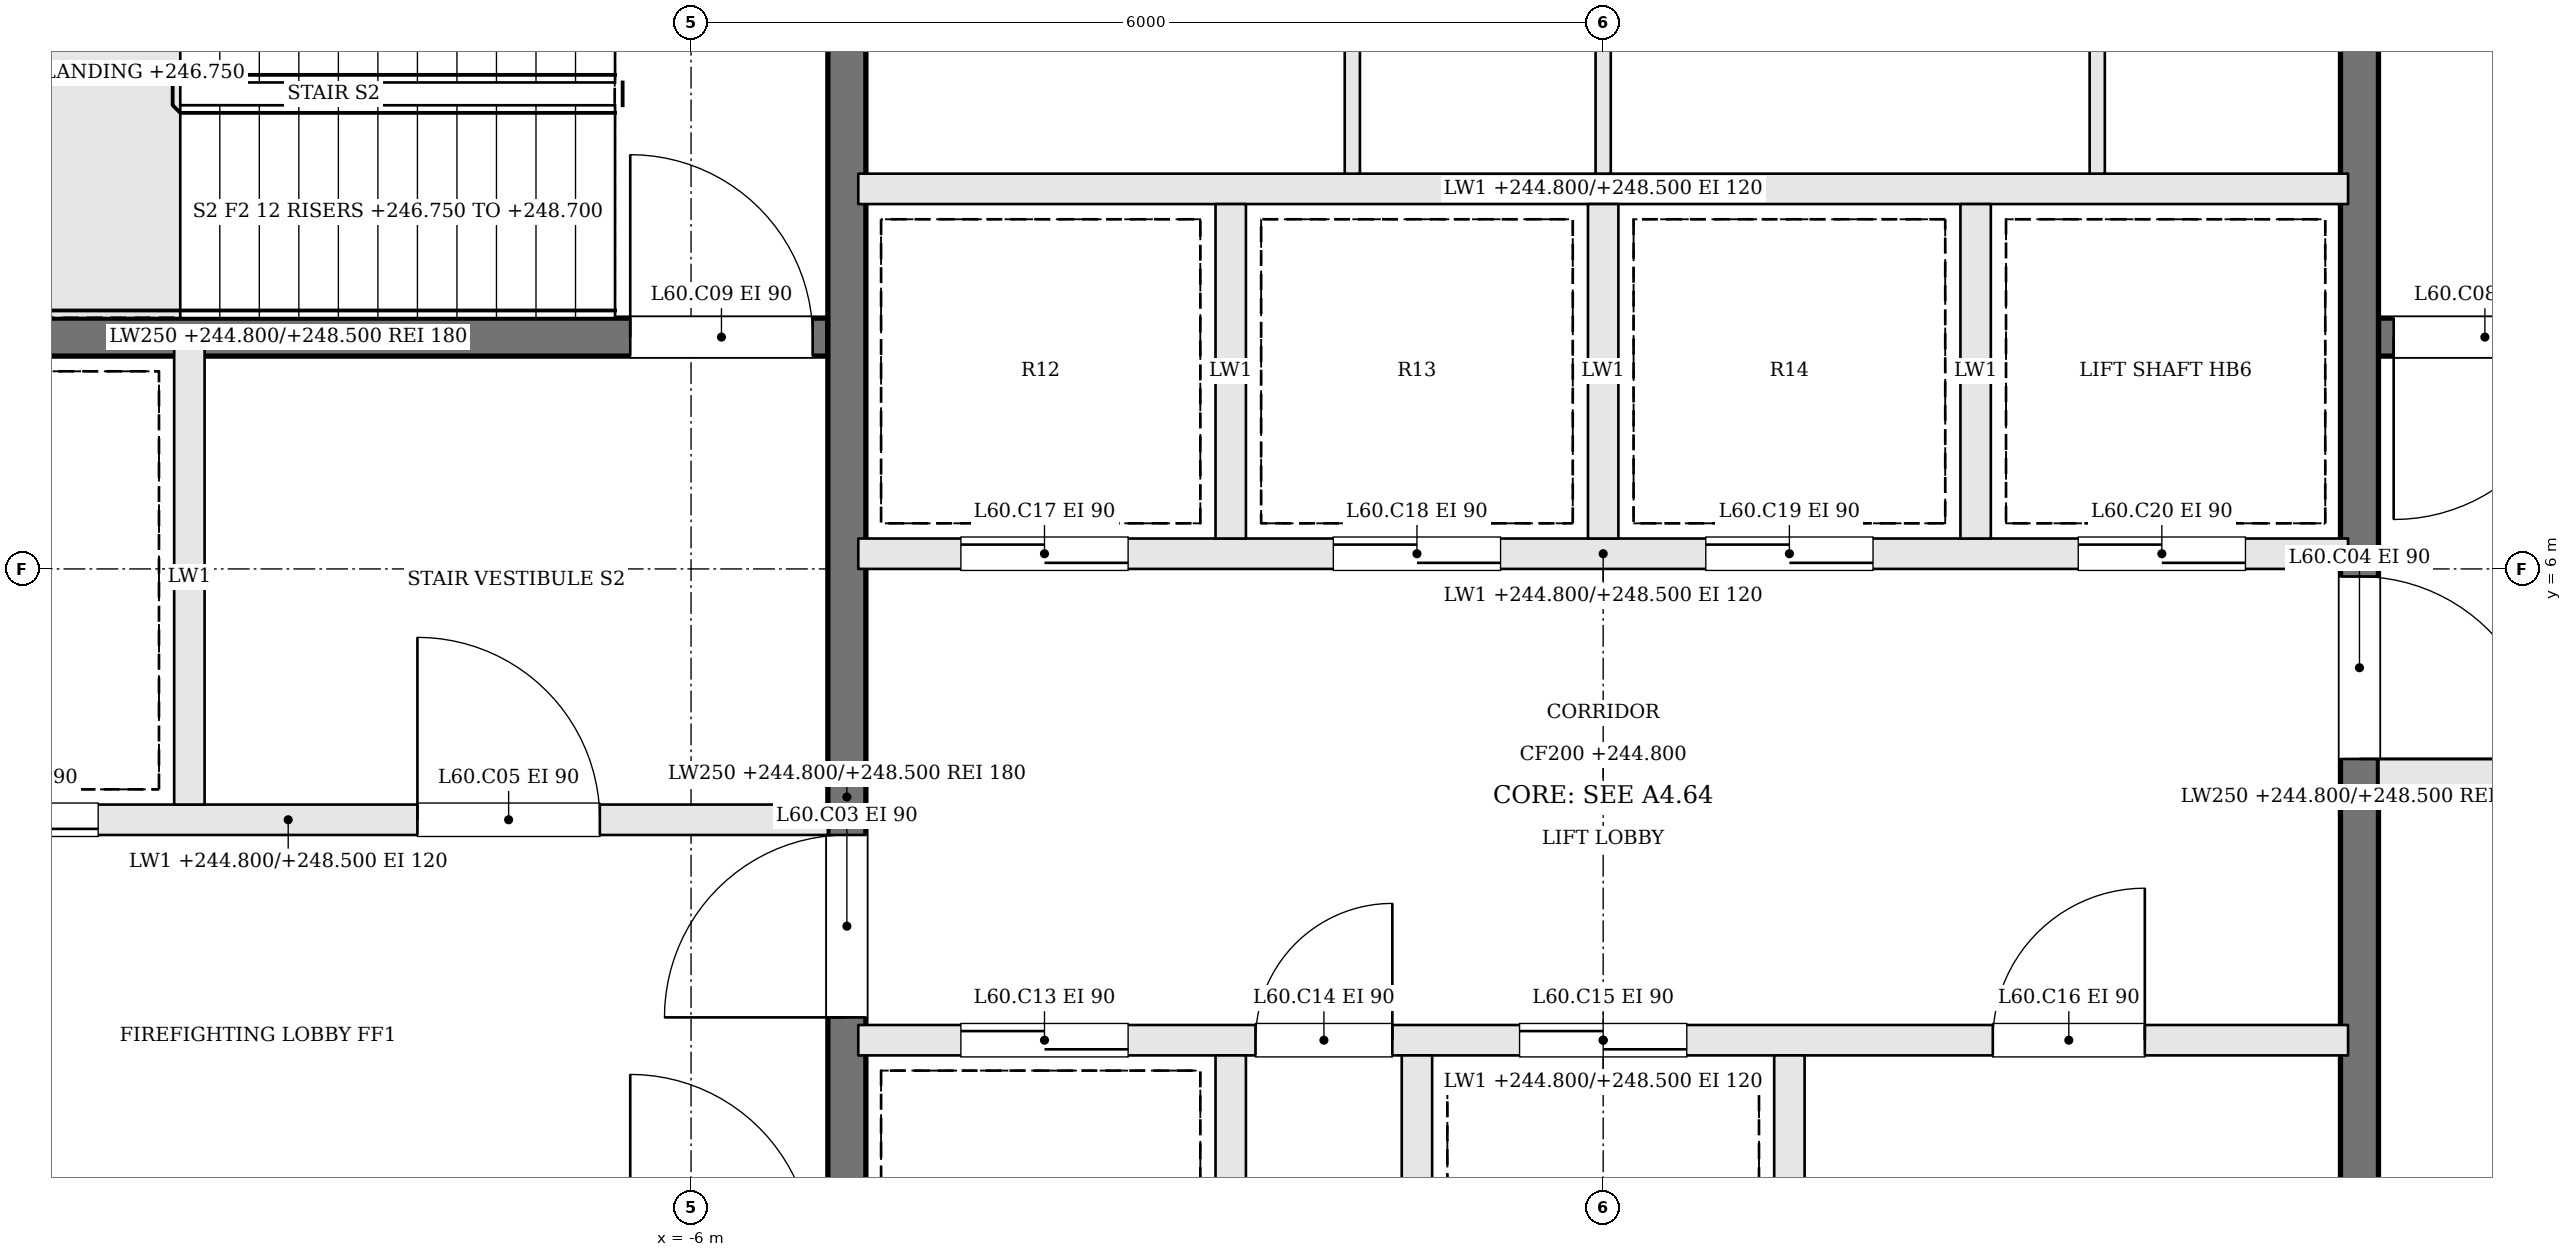
"""IFC4 building model, lengths in metres.
Left out: names, types, materials, properties, quantities, classifications, styles, units other than length and angle.
Written with IfcOpenShell. Run it as: python <this file> out.ifc"""

import sys

from ifc_helpers import new_model, si_unit, direction, frame, frame_2d, origin, place, context, subcontext, project, spatial, rectangle, extrude, element, fill, save


model = new_model("IFC4")
c1 = context("Model", 3, precision=1e-05, world=origin(), true_north=direction((0.0, 1.0)))
c2 = subcontext(c1, "Body", "Model", "MODEL_VIEW")
j1 = project(units=[si_unit("LENGTHUNIT", "METRE"), si_unit("PLANEANGLEUNIT", "RADIAN")], contexts=[c1])
p1 = place(None, origin())
s1 = spatial("IfcSite", under=j1, at=p1, CompositionType="ELEMENT")
p2 = place(p1, origin())
s2 = spatial("IfcBuilding", under=s1, at=p2, CompositionType="ELEMENT")
p3 = place(p2, frame((0.0, 0.0, 244.8)))
s3 = spatial("IfcBuildingStorey", under=s2, at=p3, CompositionType="ELEMENT", Elevation=244.8)
p4 = place(p3, frame((12.2, 7.525, 0.0), z_axis=(0.0, 0.0, 1.0), x_axis=(-1.0, 0.0, 0.0)))
e1 = element("IfcWall", 1, at=p4, inside=s3, PredefinedType="SOLIDWALL", context=c2, shape_type="SweptSolid", body=[
    extrude(rectangle(XDim=7.1, YDim=0.25, at=frame_2d((3.55, 0.0))), origin(), (0.0, 0.0, 1.0), 3.7),
])
p5 = place(p4, frame((5.8, 0.0, 0.0)))
e2 = element("IfcOpeningElement", 2, at=p5, cuts=e1, PredefinedType="OPENING", context=c2, shape_type="SweptSolid", body=[
    extrude(rectangle(XDim=1.2, YDim=2.1, at=frame_2d((0.6, 1.05))), frame((0.0, 0.135, 0.0), z_axis=(0.0, -1.0, 0.0), x_axis=(1.0, 0.0, 0.0)), (0.0, 0.0, 1.0), 0.27),
])
p6 = place(p3, frame((-12.2, 4.35, 0.0), z_axis=(0.0, 0.0, 1.0), x_axis=(1.0, 0.0, 0.0)))
e3 = element("IfcWall", 3, at=p6, inside=s3, PredefinedType="SOLIDWALL", context=c2, shape_type="SweptSolid", body=[
    extrude(rectangle(XDim=7.1, YDim=0.2, at=frame_2d((3.55, 0.0))), origin(), (0.0, 0.0, 1.0), 3.7),
])
p7 = place(p6, frame((4.4, 0.0, 0.0)))
e4 = element("IfcOpeningElement", 4, at=p7, cuts=e3, PredefinedType="OPENING", context=c2, shape_type="SweptSolid", body=[
    extrude(rectangle(XDim=1.2, YDim=2.1, at=frame_2d((0.6, 1.05))), frame((0.0, 0.11, 0.0), z_axis=(0.0, -1.0, 0.0), x_axis=(1.0, 0.0, 0.0)), (0.0, 0.0, 1.0), 0.22),
])
p8 = place(p6, frame((1.1, 0.0, 0.0)))
e5 = element("IfcOpeningElement", 5, at=p8, cuts=e3, PredefinedType="OPENING", context=c2, shape_type="SweptSolid", body=[
    extrude(rectangle(XDim=1.2, YDim=2.1, at=frame_2d((0.6, 1.05))), frame((0.0, 0.11, 0.0), z_axis=(0.0, -1.0, 0.0), x_axis=(1.0, 0.0, 0.0)), (0.0, 0.0, 1.0), 0.22),
])
p9 = place(p3, frame((12.2, 4.65, 0.0), z_axis=(0.0, 0.0, 1.0), x_axis=(-1.0, 0.0, 0.0)))
e6 = element("IfcWall", 6, at=p9, inside=s3, PredefinedType="SOLIDWALL", context=c2, shape_type="SweptSolid", body=[
    extrude(rectangle(XDim=7.1, YDim=0.2, at=frame_2d((3.55, 0.0))), origin(), (0.0, 0.0, 1.0), 3.7),
])
p10 = place(p9, frame((4.4, 0.0, 0.0)))
e7 = element("IfcOpeningElement", 7, at=p10, cuts=e6, PredefinedType="OPENING", context=c2, shape_type="SweptSolid", body=[
    extrude(rectangle(XDim=1.2, YDim=2.1, at=frame_2d((0.6, 1.05))), frame((0.0, 0.11, 0.0), z_axis=(0.0, -1.0, 0.0), x_axis=(1.0, 0.0, 0.0)), (0.0, 0.0, 1.0), 0.22),
])
p11 = place(p9, frame((1.1, 0.0, 0.0)))
e8 = element("IfcOpeningElement", 8, at=p11, cuts=e6, PredefinedType="OPENING", context=c2, shape_type="SweptSolid", body=[
    extrude(rectangle(XDim=1.2, YDim=2.1, at=frame_2d((0.6, 1.05))), frame((0.0, 0.11, 0.0), z_axis=(0.0, -1.0, 0.0), x_axis=(1.0, 0.0, 0.0)), (0.0, 0.0, 1.0), 0.22),
])
p12 = place(p3, frame((-12.2, 7.525, 0.0), z_axis=(0.0, 0.0, 1.0), x_axis=(1.0, 0.0, 0.0)))
e9 = element("IfcWall", 9, at=p12, inside=s3, PredefinedType="SOLIDWALL", context=c2, shape_type="SweptSolid", body=[
    extrude(rectangle(XDim=7.1, YDim=0.25, at=frame_2d((3.55, 0.0))), origin(), (0.0, 0.0, 1.0), 3.7),
])
p13 = place(p12, frame((5.8, 0.0, 0.0)))
e10 = element("IfcOpeningElement", 10, at=p13, cuts=e9, PredefinedType="OPENING", context=c2, shape_type="SweptSolid", body=[
    extrude(rectangle(XDim=1.2, YDim=2.1, at=frame_2d((0.6, 1.05))), frame((0.0, 0.135, 0.0), z_axis=(0.0, -1.0, 0.0), x_axis=(1.0, 0.0, 0.0)), (0.0, 0.0, 1.0), 0.27),
])
p14 = place(p3, frame((-9.3, 4.45, 0.0), z_axis=(0.0, 0.0, 1.0), x_axis=(0.0, 1.0, 0.0)))
e11 = element("IfcWall", 11, at=p14, inside=s3, PredefinedType="SOLIDWALL", context=c2, shape_type="SweptSolid", body=[
    extrude(rectangle(XDim=3.0, YDim=0.2, at=frame_2d((1.5, 0.0))), origin(), (0.0, 0.0, 1.0), 3.7),
])
p15 = place(p3, frame((-4.975, -2.2, 0.0), z_axis=(0.0, 0.0, 1.0), x_axis=(0.0, 1.0, 0.0)))
e12 = element("IfcWall", 12, at=p15, inside=s3, PredefinedType="SOLIDWALL", context=c2, shape_type="SweptSolid", body=[
    extrude(rectangle(XDim=13.4, YDim=0.25, at=frame_2d((6.7, 0.0))), origin(), (0.0, 0.0, 1.0), 3.7),
])
p16 = place(p15, frame((5.25, 0.0, 0.0)))
e13 = element("IfcOpeningElement", 13, at=p16, cuts=e12, PredefinedType="OPENING", context=c2, shape_type="SweptSolid", body=[
    extrude(rectangle(XDim=1.2, YDim=2.1, at=frame_2d((0.6, 1.05))), frame((0.0, 0.135, 0.0), z_axis=(0.0, -1.0, 0.0), x_axis=(1.0, 0.0, 0.0)), (0.0, 0.0, 1.0), 0.27),
])
p17 = place(p3, frame((4.975, 11.2, 0.0), z_axis=(0.0, 0.0, 1.0), x_axis=(0.0, -1.0, 0.0)))
e14 = element("IfcWall", 14, at=p17, inside=s3, PredefinedType="SOLIDWALL", context=c2, shape_type="SweptSolid", body=[
    extrude(rectangle(XDim=13.4, YDim=0.25, at=frame_2d((6.7, 0.0))), origin(), (0.0, 0.0, 1.0), 3.7),
])
p18 = place(p17, frame((5.25, 0.0, 0.0)))
e15 = element("IfcOpeningElement", 15, at=p18, cuts=e14, PredefinedType="OPENING", context=c2, shape_type="SweptSolid", body=[
    extrude(rectangle(XDim=1.2, YDim=2.1, at=frame_2d((0.6, 1.05))), frame((0.0, 0.135, 0.0), z_axis=(0.0, -1.0, 0.0), x_axis=(1.0, 0.0, 0.0)), (0.0, 0.0, 1.0), 0.27),
])
p19 = place(p3, frame((-4.9, 2.9, 0.0), z_axis=(0.0, 0.0, 1.0), x_axis=(1.0, 0.0, 0.0)))
e16 = element("IfcWall", 16, at=p19, inside=s3, PredefinedType="SOLIDWALL", context=c2, shape_type="SweptSolid", body=[
    extrude(rectangle(XDim=9.8, YDim=0.2, at=frame_2d((4.9, 0.0))), origin(), (0.0, 0.0, 1.0), 3.7),
])
p20 = place(p19, frame((0.675, 0.0, 0.0)))
e17 = element("IfcOpeningElement", 17, at=p20, cuts=e16, PredefinedType="OPENING", context=c2, shape_type="SweptSolid", body=[
    extrude(rectangle(XDim=1.1, YDim=2.1, at=frame_2d((0.55, 1.05))), frame((0.0, 0.11, 0.0), z_axis=(0.0, -1.0, 0.0), x_axis=(1.0, 0.0, 0.0)), (0.0, 0.0, 1.0), 0.22),
])
p21 = place(p19, frame((2.613, 0.0, 0.0)))
e18 = element("IfcOpeningElement", 18, at=p21, cuts=e16, PredefinedType="OPENING", context=c2, shape_type="SweptSolid", body=[
    extrude(rectangle(XDim=0.9, YDim=2.1, at=frame_2d((0.45, 1.05))), frame((0.0, 0.11, 0.0), z_axis=(0.0, -1.0, 0.0), x_axis=(1.0, 0.0, 0.0)), (0.0, 0.0, 1.0), 0.22),
])
p22 = place(p19, frame((4.35, 0.0, 0.0)))
e19 = element("IfcOpeningElement", 19, at=p22, cuts=e16, PredefinedType="OPENING", context=c2, shape_type="SweptSolid", body=[
    extrude(rectangle(XDim=1.1, YDim=2.1, at=frame_2d((0.55, 1.05))), frame((0.0, 0.11, 0.0), z_axis=(0.0, -1.0, 0.0), x_axis=(1.0, 0.0, 0.0)), (0.0, 0.0, 1.0), 0.22),
])
p23 = place(p19, frame((7.463, 0.0, 0.0)))
e20 = element("IfcOpeningElement", 20, at=p23, cuts=e16, PredefinedType="OPENING", context=c2, shape_type="SweptSolid", body=[
    extrude(rectangle(XDim=1.0, YDim=2.1, at=frame_2d((0.5, 1.05))), frame((0.0, 0.11, 0.0), z_axis=(0.0, -1.0, 0.0), x_axis=(1.0, 0.0, 0.0)), (0.0, 0.0, 1.0), 0.22),
])
p24 = place(p3, frame((-4.9, 6.1, 0.0), z_axis=(0.0, 0.0, 1.0), x_axis=(1.0, 0.0, 0.0)))
e21 = element("IfcWall", 21, at=p24, inside=s3, PredefinedType="SOLIDWALL", context=c2, shape_type="SweptSolid", body=[
    extrude(rectangle(XDim=9.8, YDim=0.2, at=frame_2d((4.9, 0.0))), origin(), (0.0, 0.0, 1.0), 3.7),
])
p25 = place(p24, frame((0.675, 0.0, 0.0)))
e22 = element("IfcOpeningElement", 22, at=p25, cuts=e21, PredefinedType="OPENING", context=c2, shape_type="SweptSolid", body=[
    extrude(rectangle(XDim=1.1, YDim=2.1, at=frame_2d((0.55, 1.05))), frame((0.0, 0.11, 0.0), z_axis=(0.0, -1.0, 0.0), x_axis=(1.0, 0.0, 0.0)), (0.0, 0.0, 1.0), 0.22),
])
p26 = place(p24, frame((3.125, 0.0, 0.0)))
e23 = element("IfcOpeningElement", 23, at=p26, cuts=e21, PredefinedType="OPENING", context=c2, shape_type="SweptSolid", body=[
    extrude(rectangle(XDim=1.1, YDim=2.1, at=frame_2d((0.55, 1.05))), frame((0.0, 0.11, 0.0), z_axis=(0.0, -1.0, 0.0), x_axis=(1.0, 0.0, 0.0)), (0.0, 0.0, 1.0), 0.22),
])
p27 = place(p24, frame((5.575, 0.0, 0.0)))
e24 = element("IfcOpeningElement", 24, at=p27, cuts=e21, PredefinedType="OPENING", context=c2, shape_type="SweptSolid", body=[
    extrude(rectangle(XDim=1.1, YDim=2.1, at=frame_2d((0.55, 1.05))), frame((0.0, 0.11, 0.0), z_axis=(0.0, -1.0, 0.0), x_axis=(1.0, 0.0, 0.0)), (0.0, 0.0, 1.0), 0.22),
])
p28 = place(p24, frame((8.025, 0.0, 0.0)))
e25 = element("IfcOpeningElement", 25, at=p28, cuts=e21, PredefinedType="OPENING", context=c2, shape_type="SweptSolid", body=[
    extrude(rectangle(XDim=1.1, YDim=2.1, at=frame_2d((0.55, 1.05))), frame((0.0, 0.11, 0.0), z_axis=(0.0, -1.0, 0.0), x_axis=(1.0, 0.0, 0.0)), (0.0, 0.0, 1.0), 0.22),
])
p29 = place(p3, frame((-4.9, 8.5, 0.0), z_axis=(0.0, 0.0, 1.0), x_axis=(1.0, 0.0, 0.0)))
e26 = element("IfcWall", 26, at=p29, inside=s3, PredefinedType="SOLIDWALL", context=c2, shape_type="SweptSolid", body=[
    extrude(rectangle(XDim=9.8, YDim=0.2, at=frame_2d((4.9, 0.0))), origin(), (0.0, 0.0, 1.0), 3.7),
])
for number, where, z_axis, x_axis in (
    (27, (-2.45, 0.6, 0.0), (0.0, 0.0, 1.0), (0.0, 1.0, 0.0)),
    (28, (-1.225, 0.6, 0.0), (0.0, 0.0, 1.0), (0.0, 1.0, 0.0)),
    (29, (1.225, 0.6, 0.0), (0.0, 0.0, 1.0), (0.0, 1.0, 0.0)),
    (30, (-2.45, 6.2, 0.0), (0.0, 0.0, 1.0), (0.0, 1.0, 0.0)),
    (31, (0.0, 6.2, 0.0), (0.0, 0.0, 1.0), (0.0, 1.0, 0.0)),
    (32, (2.45, 6.2, 0.0), (0.0, 0.0, 1.0), (0.0, 1.0, 0.0)),
):
    element("IfcWall", number, at=place(p3, frame(where, z_axis=z_axis, x_axis=x_axis)), inside=s3, PredefinedType="SOLIDWALL", context=c2, shape_type="SweptSolid", body=[
        extrude(rectangle(XDim=2.2, YDim=0.2, at=frame_2d((1.1, 0.0))), origin(), (0.0, 0.0, 1.0), 3.7),
    ])
for number, where, z_axis, x_axis in (
    (33, (-1.65, 8.6, 0.0), (0.0, 0.0, 1.0), (0.0, 1.0, 0.0)),
    (34, (0.0, 8.6, 0.0), (0.0, 0.0, 1.0), (0.0, 1.0, 0.0)),
    (35, (3.25, 8.6, 0.0), (0.0, 0.0, 1.0), (0.0, 1.0, 0.0)),
):
    element("IfcWall", number, at=place(p3, frame(where, z_axis=z_axis, x_axis=x_axis)), inside=s3, PredefinedType="PARTITIONING", context=c2, shape_type="SweptSolid", body=[
        extrude(rectangle(XDim=2.6, YDim=0.1, at=frame_2d((1.3, 0.0))), origin(), (0.0, 0.0, 1.0), 3.7),
    ])
p30 = place(p16, origin())
e36 = element("IfcDoor", 36, at=p30, inside=s3, OperationType="SINGLE_SWING_LEFT", PredefinedType="DOOR", context=c2, shape_type="SweptSolid", body=[
    extrude(rectangle(XDim=1.2, YDim=2.1, at=frame_2d((0.6, 1.05))), frame((0.0, 0.025, 0.0), z_axis=(0.0, -1.0, 0.0), x_axis=(1.0, 0.0, 0.0)), (0.0, 0.0, 1.0), 0.05),
])
fill(e13, e36)
p31 = place(p18, origin())
e37 = element("IfcDoor", 37, at=p31, inside=s3, OperationType="SINGLE_SWING_RIGHT", PredefinedType="DOOR", context=c2, shape_type="SweptSolid", body=[
    extrude(rectangle(XDim=1.2, YDim=2.1, at=frame_2d((0.6, 1.05))), frame((0.0, 0.025, 0.0), z_axis=(0.0, -1.0, 0.0), x_axis=(1.0, 0.0, 0.0)), (0.0, 0.0, 1.0), 0.05),
])
fill(e15, e37)
p32 = place(p7, origin())
e38 = element("IfcDoor", 38, at=p32, inside=s3, OperationType="SINGLE_SWING_LEFT", PredefinedType="DOOR", context=c2, shape_type="SweptSolid", body=[
    extrude(rectangle(XDim=1.2, YDim=2.1, at=frame_2d((0.6, 1.05))), frame((0.0, 0.025, 0.0), z_axis=(0.0, -1.0, 0.0), x_axis=(1.0, 0.0, 0.0)), (0.0, 0.0, 1.0), 0.05),
])
fill(e4, e38)
p33 = place(p5, origin())
e39 = element("IfcDoor", 39, at=p33, inside=s3, OperationType="SINGLE_SWING_RIGHT", PredefinedType="DOOR", context=c2, shape_type="SweptSolid", body=[
    extrude(rectangle(XDim=1.2, YDim=2.1, at=frame_2d((0.6, 1.05))), frame((0.0, 0.025, 0.0), z_axis=(0.0, -1.0, 0.0), x_axis=(1.0, 0.0, 0.0)), (0.0, 0.0, 1.0), 0.05),
])
fill(e2, e39)
p34 = place(p13, origin())
e40 = element("IfcDoor", 40, at=p34, inside=s3, OperationType="SINGLE_SWING_LEFT", PredefinedType="DOOR", context=c2, shape_type="SweptSolid", body=[
    extrude(rectangle(XDim=1.2, YDim=2.1, at=frame_2d((0.6, 1.05))), frame((0.0, 0.025, 0.0), z_axis=(0.0, -1.0, 0.0), x_axis=(1.0, 0.0, 0.0)), (0.0, 0.0, 1.0), 0.05),
])
fill(e10, e40)
p35 = place(p8, origin())
e41 = element("IfcDoor", 41, at=p35, inside=s3, OperationType="SLIDING_TO_RIGHT", PredefinedType="DOOR", context=c2, shape_type="SweptSolid", body=[
    extrude(rectangle(XDim=1.2, YDim=2.1, at=frame_2d((0.6, 1.05))), frame((0.0, 0.025, 0.0), z_axis=(0.0, -1.0, 0.0), x_axis=(1.0, 0.0, 0.0)), (0.0, 0.0, 1.0), 0.05),
])
fill(e5, e41)
p36 = place(p20, origin())
e42 = element("IfcDoor", 42, at=p36, inside=s3, OperationType="SLIDING_TO_RIGHT", PredefinedType="DOOR", context=c2, shape_type="SweptSolid", body=[
    extrude(rectangle(XDim=1.1, YDim=2.1, at=frame_2d((0.55, 1.05))), frame((0.0, 0.025, 0.0), z_axis=(0.0, -1.0, 0.0), x_axis=(1.0, 0.0, 0.0)), (0.0, 0.0, 1.0), 0.05),
])
fill(e17, e42)
p37 = place(p21, origin())
e43 = element("IfcDoor", 43, at=p37, inside=s3, OperationType="SINGLE_SWING_RIGHT", PredefinedType="DOOR", context=c2, shape_type="SweptSolid", body=[
    extrude(rectangle(XDim=0.9, YDim=2.1, at=frame_2d((0.45, 1.05))), frame((0.0, 0.025, 0.0), z_axis=(0.0, -1.0, 0.0), x_axis=(1.0, 0.0, 0.0)), (0.0, 0.0, 1.0), 0.05),
])
fill(e18, e43)
p38 = place(p22, origin())
e44 = element("IfcDoor", 44, at=p38, inside=s3, OperationType="SLIDING_TO_LEFT", PredefinedType="DOOR", context=c2, shape_type="SweptSolid", body=[
    extrude(rectangle(XDim=1.1, YDim=2.1, at=frame_2d((0.55, 1.05))), frame((0.0, 0.025, 0.0), z_axis=(0.0, -1.0, 0.0), x_axis=(1.0, 0.0, 0.0)), (0.0, 0.0, 1.0), 0.05),
])
fill(e19, e44)
p39 = place(p23, origin())
e45 = element("IfcDoor", 45, at=p39, inside=s3, OperationType="SINGLE_SWING_RIGHT", PredefinedType="DOOR", context=c2, shape_type="SweptSolid", body=[
    extrude(rectangle(XDim=1.0, YDim=2.1, at=frame_2d((0.5, 1.05))), frame((0.0, 0.025, 0.0), z_axis=(0.0, -1.0, 0.0), x_axis=(1.0, 0.0, 0.0)), (0.0, 0.0, 1.0), 0.05),
])
fill(e20, e45)
p40 = place(p25, origin())
e46 = element("IfcDoor", 46, at=p40, inside=s3, OperationType="SLIDING_TO_RIGHT", PredefinedType="DOOR", context=c2, shape_type="SweptSolid", body=[
    extrude(rectangle(XDim=1.1, YDim=2.1, at=frame_2d((0.55, 1.05))), frame((0.0, 0.025, 0.0), z_axis=(0.0, -1.0, 0.0), x_axis=(1.0, 0.0, 0.0)), (0.0, 0.0, 1.0), 0.05),
])
fill(e22, e46)
p41 = place(p26, origin())
e47 = element("IfcDoor", 47, at=p41, inside=s3, OperationType="SLIDING_TO_LEFT", PredefinedType="DOOR", context=c2, shape_type="SweptSolid", body=[
    extrude(rectangle(XDim=1.1, YDim=2.1, at=frame_2d((0.55, 1.05))), frame((0.0, 0.025, 0.0), z_axis=(0.0, -1.0, 0.0), x_axis=(1.0, 0.0, 0.0)), (0.0, 0.0, 1.0), 0.05),
])
fill(e23, e47)
p42 = place(p27, origin())
e48 = element("IfcDoor", 48, at=p42, inside=s3, OperationType="SLIDING_TO_RIGHT", PredefinedType="DOOR", context=c2, shape_type="SweptSolid", body=[
    extrude(rectangle(XDim=1.1, YDim=2.1, at=frame_2d((0.55, 1.05))), frame((0.0, 0.025, 0.0), z_axis=(0.0, -1.0, 0.0), x_axis=(1.0, 0.0, 0.0)), (0.0, 0.0, 1.0), 0.05),
])
fill(e24, e48)
p43 = place(p28, origin())
e49 = element("IfcDoor", 49, at=p43, inside=s3, OperationType="SLIDING_TO_LEFT", PredefinedType="DOOR", context=c2, shape_type="SweptSolid", body=[
    extrude(rectangle(XDim=1.1, YDim=2.1, at=frame_2d((0.55, 1.05))), frame((0.0, 0.025, 0.0), z_axis=(0.0, -1.0, 0.0), x_axis=(1.0, 0.0, 0.0)), (0.0, 0.0, 1.0), 0.05),
])
fill(e25, e49)
save(model, sys.argv[1])
